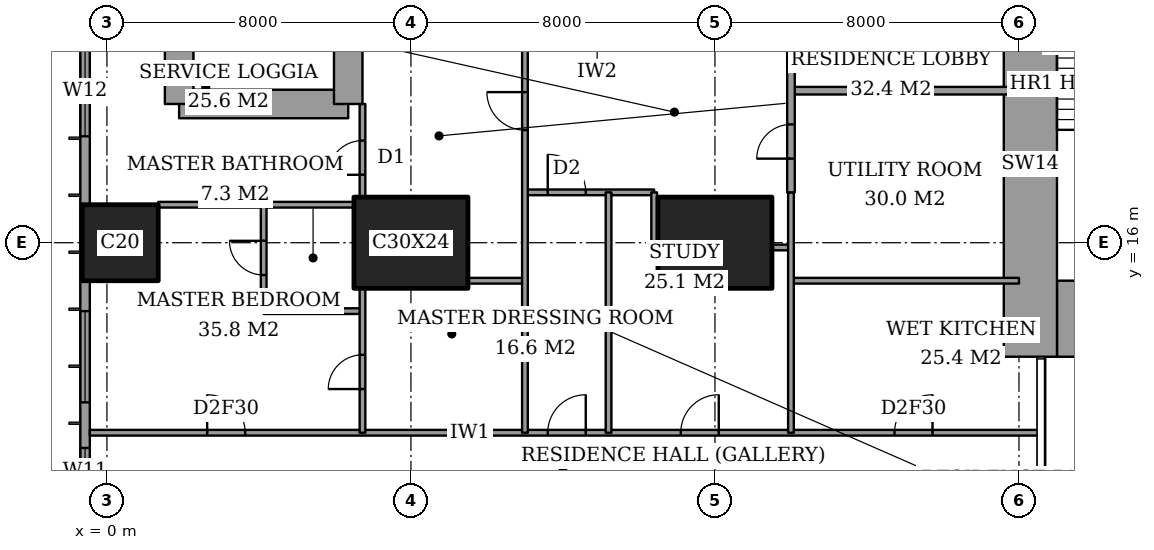
"""IFC4 building model, lengths in metres.
Left out: names, types, materials, properties, quantities, classifications, styles, units other than length and angle.
Written with IfcOpenShell. Run it as: python <this file> out.ifc"""

import sys

from ifc_helpers import new_model, si_unit, direction, frame, frame_2d, origin, origin_2d, place, context, subcontext, project, spatial, rectangle, extrude, element, fill, save


model = new_model("IFC4")
c1 = context("Model", 3, precision=1e-05, world=origin(), true_north=direction((0.0, 1.0)))
c2 = subcontext(c1, "Body", "Model", "MODEL_VIEW")
j1 = project(units=[si_unit("LENGTHUNIT", "METRE"), si_unit("PLANEANGLEUNIT", "RADIAN")], contexts=[c1])
p1 = place(None, origin())
s1 = spatial("IfcSite", under=j1, at=p1, CompositionType="ELEMENT")
p2 = place(p1, origin())
s2 = spatial("IfcBuilding", under=s1, at=p2, CompositionType="ELEMENT")
p3 = place(p2, frame((0.0, 0.0, 150.2)))
s3 = spatial("IfcBuildingStorey", under=s2, at=p3, CompositionType="ELEMENT", Elevation=150.2)
p4 = place(p3, frame((0.35, 16.0, 0.0), z_axis=(0.0, 0.0, 1.0), x_axis=(1.0, 0.0, 0.0)))
e1 = element("IfcColumn", 1, at=p4, inside=s3, PredefinedType="COLUMN", context=c2, shape_type="SweptSolid", body=[
    extrude(rectangle(XDim=2.0, YDim=2.0, at=origin_2d()), origin(), (0.0, 0.0, 1.0), 3.6),
])
for number, where, z_axis, x_axis in (
    (2, (8.0, 16.0, 0.0), (0.0, 0.0, 1.0), (1.0, 0.0, 0.0)),
    (3, (16.0, 16.0, 0.0), (0.0, 0.0, 1.0), (1.0, 0.0, 0.0)),
):
    element("IfcColumn", number, at=place(p3, frame(where, z_axis=z_axis, x_axis=x_axis)), inside=s3, PredefinedType="COLUMN", context=c2, shape_type="SweptSolid", body=[
        extrude(rectangle(XDim=3.0, YDim=2.4, at=origin_2d()), origin(), (0.0, 0.0, 1.0), 3.6),
    ])
p5 = place(p3, frame((25.0, 14.0, 0.0), z_axis=(0.0, 0.0, 1.0), x_axis=(1.0, 0.0, 0.0)))
e4 = element("IfcWall", 4, at=p5, inside=s3, PredefinedType="SHEAR", context=c2, shape_type="SweptSolid", body=[
    extrude(rectangle(XDim=3.15, YDim=2.0, at=frame_2d((1.575, 0.0))), origin(), (0.0, 0.0, 1.0), 3.6),
])
p6 = place(p3, frame((24.3, 13.0, 0.0), z_axis=(0.0, 0.0, 1.0), x_axis=(0.0, 1.0, 0.0)))
e5 = element("IfcWall", 5, at=p6, inside=s3, PredefinedType="SHEAR", context=c2, shape_type="SweptSolid", body=[
    extrude(rectangle(XDim=10.15, YDim=1.4, at=frame_2d((5.075, 0.0))), origin(), (0.0, 0.0, 1.0), 3.6),
])
p7 = place(p3, frame((1.9, 19.65, 0.0), z_axis=(0.0, 0.0, 1.0), x_axis=(1.0, 0.0, 0.0)))
e6 = element("IfcWall", 6, at=p7, inside=s3, PredefinedType="SHEAR", context=c2, shape_type="SweptSolid", body=[
    extrude(rectangle(XDim=4.45, YDim=0.75, at=frame_2d((2.225, 0.0))), origin(), (0.0, 0.0, 1.0), 3.6),
])
p8 = place(p3, frame((6.35, 19.65, 0.0), z_axis=(0.0, 0.0, 1.0), x_axis=(0.0, 1.0, 0.0)))
e7 = element("IfcWall", 7, at=p8, inside=s3, PredefinedType="SHEAR", context=c2, shape_type="SweptSolid", body=[
    extrude(rectangle(XDim=8.7, YDim=0.75, at=frame_2d((4.35, 0.0))), origin(), (0.0, 0.0, 1.0), 3.6),
])
p9 = place(p8, frame((6.725, 0.0, 0.0)))
e8 = element("IfcOpeningElement", 8, at=p9, cuts=e7, PredefinedType="OPENING", context=c2, shape_type="SweptSolid", body=[
    extrude(rectangle(XDim=1.0, YDim=2.1, at=frame_2d((0.5, 1.05))), frame((0.0, 0.385, 0.0), z_axis=(0.0, -1.0, 0.0), x_axis=(1.0, 0.0, 0.0)), (0.0, 0.0, 1.0), 0.77),
])
p10 = place(p3, frame((1.9, 28.35, 0.0), z_axis=(0.0, 0.0, 1.0), x_axis=(0.0, -1.0, 0.0)))
e9 = element("IfcWall", 9, at=p10, inside=s3, PredefinedType="SHEAR", context=c2, shape_type="SweptSolid", body=[
    extrude(rectangle(XDim=8.7, YDim=0.75, at=frame_2d((4.35, 0.0))), origin(), (0.0, 0.0, 1.0), 3.6),
])
p11 = place(p3, frame((-0.575, 44.825, 0.0), z_axis=(0.0, 0.0, 1.0), x_axis=(0.0, -1.0, 0.0)))
e10 = element("IfcWall", 10, at=p11, inside=s3, PredefinedType="SOLIDWALL", context=c2, shape_type="SweptSolid", body=[
    extrude(rectangle(XDim=41.65, YDim=0.25, at=frame_2d((20.825, 0.0))), origin(), (0.0, 0.0, 1.0), 3.6),
])
p12 = place(p11, frame((0.775, 0.0, 0.4)))
e11 = element("IfcOpeningElement", 11, at=p12, cuts=e10, PredefinedType="OPENING", context=c2, shape_type="SweptSolid", body=[
    extrude(rectangle(XDim=2.4, YDim=2.2, at=frame_2d((1.2, 1.1))), frame((0.0, 0.135, 0.0), z_axis=(0.0, -1.0, 0.0), x_axis=(1.0, 0.0, 0.0)), (0.0, 0.0, 1.0), 0.27),
])
p13 = place(p11, frame((6.1, 0.0, 0.4)))
e12 = element("IfcOpeningElement", 12, at=p13, cuts=e10, PredefinedType="OPENING", context=c2, shape_type="SweptSolid", body=[
    extrude(rectangle(XDim=1.2, YDim=2.2, at=frame_2d((0.6, 1.1))), frame((0.0, 0.135, 0.0), z_axis=(0.0, -1.0, 0.0), x_axis=(1.0, 0.0, 0.0)), (0.0, 0.0, 1.0), 0.27),
])
p14 = place(p11, frame((8.425, 0.0, 0.4)))
e13 = element("IfcOpeningElement", 13, at=p14, cuts=e10, PredefinedType="OPENING", context=c2, shape_type="SweptSolid", body=[
    extrude(rectangle(XDim=2.4, YDim=2.2, at=frame_2d((1.2, 1.1))), frame((0.0, 0.135, 0.0), z_axis=(0.0, -1.0, 0.0), x_axis=(1.0, 0.0, 0.0)), (0.0, 0.0, 1.0), 0.27),
])
p15 = place(p11, frame((15.625, 0.0, 0.4)))
e14 = element("IfcOpeningElement", 14, at=p15, cuts=e10, PredefinedType="OPENING", context=c2, shape_type="SweptSolid", body=[
    extrude(rectangle(XDim=2.4, YDim=2.2, at=frame_2d((1.2, 1.1))), frame((0.0, 0.135, 0.0), z_axis=(0.0, -1.0, 0.0), x_axis=(1.0, 0.0, 0.0)), (0.0, 0.0, 1.0), 0.27),
])
p16 = place(p11, frame((23.625, 0.0, 0.4)))
e15 = element("IfcOpeningElement", 15, at=p16, cuts=e10, PredefinedType="OPENING", context=c2, shape_type="SweptSolid", body=[
    extrude(rectangle(XDim=2.4, YDim=2.2, at=frame_2d((1.2, 1.1))), frame((0.0, 0.135, 0.0), z_axis=(0.0, -1.0, 0.0), x_axis=(1.0, 0.0, 0.0)), (0.0, 0.0, 1.0), 0.27),
])
p17 = place(p11, frame((30.625, 0.0, 0.4)))
e16 = element("IfcOpeningElement", 16, at=p17, cuts=e10, PredefinedType="OPENING", context=c2, shape_type="SweptSolid", body=[
    extrude(rectangle(XDim=2.4, YDim=2.2, at=frame_2d((1.2, 1.1))), frame((0.0, 0.135, 0.0), z_axis=(0.0, -1.0, 0.0), x_axis=(1.0, 0.0, 0.0)), (0.0, 0.0, 1.0), 0.27),
])
p18 = place(p11, frame((34.225, 0.0, 0.4)))
e17 = element("IfcOpeningElement", 17, at=p18, cuts=e10, PredefinedType="OPENING", context=c2, shape_type="SweptSolid", body=[
    extrude(rectangle(XDim=1.2, YDim=2.2, at=frame_2d((0.6, 1.1))), frame((0.0, 0.135, 0.0), z_axis=(0.0, -1.0, 0.0), x_axis=(1.0, 0.0, 0.0)), (0.0, 0.0, 1.0), 0.27),
])
p19 = place(p11, frame((38.475, 0.0, 0.4)))
e18 = element("IfcOpeningElement", 18, at=p19, cuts=e10, PredefinedType="OPENING", context=c2, shape_type="SweptSolid", body=[
    extrude(rectangle(XDim=2.4, YDim=2.2, at=frame_2d((1.2, 1.1))), frame((0.0, 0.135, 0.0), z_axis=(0.0, -1.0, 0.0), x_axis=(1.0, 0.0, 0.0)), (0.0, 0.0, 1.0), 0.27),
])
p20 = place(p3, frame((-0.45, 11.0, 0.0), z_axis=(0.0, 0.0, 1.0), x_axis=(1.0, 0.0, 0.0)))
e19 = element("IfcWall", 19, at=p20, inside=s3, PredefinedType="PARTITIONING", context=c2, shape_type="SweptSolid", body=[
    extrude(rectangle(XDim=25.011, YDim=0.15, at=frame_2d((12.505, 0.0))), origin(), (0.0, 0.0, 1.0), 3.35),
])
p21 = place(p20, frame((12.05, 0.0, 0.0)))
e20 = element("IfcOpeningElement", 20, at=p21, cuts=e19, PredefinedType="OPENING", context=c2, shape_type="SweptSolid", body=[
    extrude(rectangle(XDim=1.0, YDim=2.1, at=frame_2d((0.5, 1.05))), frame((0.0, 0.085, 0.0), z_axis=(0.0, -1.0, 0.0), x_axis=(1.0, 0.0, 0.0)), (0.0, 0.0, 1.0), 0.17),
])
p22 = place(p20, frame((3.087, 0.0, 0.0)))
e21 = element("IfcOpeningElement", 21, at=p22, cuts=e19, PredefinedType="OPENING", context=c2, shape_type="SweptSolid", body=[
    extrude(rectangle(XDim=1.0, YDim=2.1, at=frame_2d((0.5, 1.05))), frame((0.0, 0.085, 0.0), z_axis=(0.0, -1.0, 0.0), x_axis=(1.0, 0.0, 0.0)), (0.0, 0.0, 1.0), 0.17),
])
p23 = place(p20, frame((15.55, 0.0, 0.0)))
e22 = element("IfcOpeningElement", 22, at=p23, cuts=e19, PredefinedType="OPENING", context=c2, shape_type="SweptSolid", body=[
    extrude(rectangle(XDim=1.0, YDim=2.1, at=frame_2d((0.5, 1.05))), frame((0.0, 0.085, 0.0), z_axis=(0.0, -1.0, 0.0), x_axis=(1.0, 0.0, 0.0)), (0.0, 0.0, 1.0), 0.17),
])
p24 = place(p20, frame((21.175, 0.0, 0.0)))
e23 = element("IfcOpeningElement", 23, at=p24, cuts=e19, PredefinedType="OPENING", context=c2, shape_type="SweptSolid", body=[
    extrude(rectangle(XDim=1.0, YDim=2.1, at=frame_2d((0.5, 1.05))), frame((0.0, 0.085, 0.0), z_axis=(0.0, -1.0, 0.0), x_axis=(1.0, 0.0, 0.0)), (0.0, 0.0, 1.0), 0.17),
])
p25 = place(p3, frame((4.125, 14.2, 0.0), z_axis=(0.0, 0.0, 1.0), x_axis=(1.0, 0.0, 0.0)))
e24 = element("IfcWall", 24, at=p25, inside=s3, PredefinedType="PARTITIONING", context=c2, shape_type="SweptSolid", body=[
    extrude(rectangle(XDim=2.6, YDim=0.15, at=frame_2d((1.3, 0.0))), origin(), (0.0, 0.0, 1.0), 3.35),
])
p26 = place(p3, frame((9.5, 15.0, 0.0), z_axis=(0.0, 0.0, 1.0), x_axis=(1.0, 0.0, 0.0)))
e25 = element("IfcWall", 25, at=p26, inside=s3, PredefinedType="PARTITIONING", context=c2, shape_type="SweptSolid", body=[
    extrude(rectangle(XDim=1.5, YDim=0.15, at=frame_2d((0.75, 0.0))), origin(), (0.0, 0.0, 1.0), 3.35),
])
p27 = place(p3, frame((18.0, 15.0, 0.0), z_axis=(0.0, 0.0, 1.0), x_axis=(1.0, 0.0, 0.0)))
e26 = element("IfcWall", 26, at=p27, inside=s3, PredefinedType="PARTITIONING", context=c2, shape_type="SweptSolid", body=[
    extrude(rectangle(XDim=6.0, YDim=0.15, at=frame_2d((3.0, 0.0))), origin(), (0.0, 0.0, 1.0), 3.35),
])
p28 = place(p3, frame((17.5, 15.875, 0.0), z_axis=(0.0, 0.0, 1.0), x_axis=(1.0, 0.0, 0.0)))
e27 = element("IfcWall", 27, at=p28, inside=s3, PredefinedType="PARTITIONING", context=c2, shape_type="SweptSolid", body=[
    extrude(rectangle(XDim=0.5, YDim=0.15, at=frame_2d((0.25, 0.0))), origin(), (0.0, 0.0, 1.0), 2.634),
])
p29 = place(p3, frame((1.35, 17.0, 0.0), z_axis=(0.0, 0.0, 1.0), x_axis=(1.0, 0.0, 0.0)))
e28 = element("IfcWall", 28, at=p29, inside=s3, PredefinedType="PARTITIONING", context=c2, shape_type="SweptSolid", body=[
    extrude(rectangle(XDim=5.15, YDim=0.15, at=frame_2d((2.575, 0.0))), origin(), (0.0, 0.0, 1.0), 3.35),
])
p30 = place(p3, frame((11.0, 17.325, 0.0), z_axis=(0.0, 0.0, 1.0), x_axis=(1.0, 0.0, 0.0)))
e29 = element("IfcWall", 29, at=p30, inside=s3, PredefinedType="PARTITIONING", context=c2, shape_type="SweptSolid", body=[
    extrude(rectangle(XDim=3.4, YDim=0.15, at=frame_2d((1.7, 0.0))), origin(), (0.0, 0.0, 1.0), 3.35),
])
p31 = place(p30, frame((0.6, 0.0, 0.0)))
e30 = element("IfcOpeningElement", 30, at=p31, cuts=e29, PredefinedType="OPENING", context=c2, shape_type="SweptSolid", body=[
    extrude(rectangle(XDim=1.0, YDim=2.1, at=frame_2d((0.5, 1.05))), frame((0.0, 0.085, 0.0), z_axis=(0.0, -1.0, 0.0), x_axis=(1.0, 0.0, 0.0)), (0.0, 0.0, 1.0), 0.17),
])
p32 = place(p3, frame((18.0, 20.0, 0.0), z_axis=(0.0, 0.0, 1.0), x_axis=(1.0, 0.0, 0.0)))
e31 = element("IfcWall", 31, at=p32, inside=s3, PredefinedType="PARTITIONING", context=c2, shape_type="SweptSolid", body=[
    extrude(rectangle(XDim=6.0, YDim=0.2, at=frame_2d((3.0, 0.0))), origin(), (0.0, 0.0, 1.0), 3.35),
])
p33 = place(p3, frame((4.125, 14.2, 0.0), z_axis=(0.0, 0.0, 1.0), x_axis=(0.0, 1.0, 0.0)))
e32 = element("IfcWall", 32, at=p33, inside=s3, PredefinedType="PARTITIONING", context=c2, shape_type="SweptSolid", body=[
    extrude(rectangle(XDim=2.8, YDim=0.15, at=frame_2d((1.4, 0.0))), origin(), (0.0, 0.0, 1.0), 3.35),
])
p34 = place(p33, frame((0.95, 0.0, 0.0)))
e33 = element("IfcOpeningElement", 33, at=p34, cuts=e32, PredefinedType="OPENING", context=c2, shape_type="SweptSolid", body=[
    extrude(rectangle(XDim=0.9, YDim=2.1, at=frame_2d((0.45, 1.05))), frame((0.0, 0.085, 0.0), z_axis=(0.0, -1.0, 0.0), x_axis=(1.0, 0.0, 0.0)), (0.0, 0.0, 1.0), 0.17),
])
p35 = place(p3, frame((6.725, 11.0, 0.0), z_axis=(0.0, 0.0, 1.0), x_axis=(0.0, 1.0, 0.0)))
e34 = element("IfcWall", 34, at=p35, inside=s3, PredefinedType="PARTITIONING", context=c2, shape_type="SweptSolid", body=[
    extrude(rectangle(XDim=3.8, YDim=0.15, at=frame_2d((1.9, 0.0))), origin(), (0.0, 0.0, 1.0), 3.35),
])
p36 = place(p35, frame((1.15, 0.0, 0.0)))
e35 = element("IfcOpeningElement", 35, at=p36, cuts=e34, PredefinedType="OPENING", context=c2, shape_type="SweptSolid", body=[
    extrude(rectangle(XDim=0.9, YDim=2.1, at=frame_2d((0.45, 1.05))), frame((0.0, 0.085, 0.0), z_axis=(0.0, -1.0, 0.0), x_axis=(1.0, 0.0, 0.0)), (0.0, 0.0, 1.0), 0.17),
])
p37 = place(p3, frame((6.725, 17.2, 0.0), z_axis=(0.0, 0.0, 1.0), x_axis=(0.0, 1.0, 0.0)))
e36 = element("IfcWall", 36, at=p37, inside=s3, PredefinedType="PARTITIONING", context=c2, shape_type="SweptSolid", body=[
    extrude(rectangle(XDim=2.45, YDim=0.15, at=frame_2d((1.225, 0.0))), origin(), (0.0, 0.0, 1.0), 3.35),
])
p38 = place(p37, frame((0.587, 0.0, 0.0)))
e37 = element("IfcOpeningElement", 37, at=p38, cuts=e36, PredefinedType="OPENING", context=c2, shape_type="SweptSolid", body=[
    extrude(rectangle(XDim=0.9, YDim=2.1, at=frame_2d((0.45, 1.05))), frame((0.0, 0.085, 0.0), z_axis=(0.0, -1.0, 0.0), x_axis=(1.0, 0.0, 0.0)), (0.0, 0.0, 1.0), 0.17),
])
p39 = place(p3, frame((11.0, 11.0, 0.0), z_axis=(0.0, 0.0, 1.0), x_axis=(0.0, 1.0, 0.0)))
e38 = element("IfcWall", 38, at=p39, inside=s3, PredefinedType="PARTITIONING", context=c2, shape_type="SweptSolid", body=[
    extrude(rectangle(XDim=10.6, YDim=0.15, at=frame_2d((5.3, 0.0))), origin(), (0.0, 0.0, 1.0), 3.35),
])
p40 = place(p39, frame((7.962, 0.0, 0.0)))
e39 = element("IfcOpeningElement", 39, at=p40, cuts=e38, PredefinedType="OPENING", context=c2, shape_type="SweptSolid", body=[
    extrude(rectangle(XDim=1.0, YDim=2.1, at=frame_2d((0.5, 1.05))), frame((0.0, 0.085, 0.0), z_axis=(0.0, -1.0, 0.0), x_axis=(1.0, 0.0, 0.0)), (0.0, 0.0, 1.0), 0.17),
])
p41 = place(p3, frame((13.2, 11.0, 0.0), z_axis=(0.0, 0.0, 1.0), x_axis=(0.0, 1.0, 0.0)))
e40 = element("IfcWall", 40, at=p41, inside=s3, PredefinedType="PARTITIONING", context=c2, shape_type="SweptSolid", body=[
    extrude(rectangle(XDim=6.325, YDim=0.15, at=frame_2d((3.163, 0.0))), origin(), (0.0, 0.0, 1.0), 3.35),
])
p42 = place(p3, frame((14.4, 15.875, 0.0), z_axis=(0.0, 0.0, 1.0), x_axis=(0.0, 1.0, 0.0)))
e41 = element("IfcWall", 41, at=p42, inside=s3, PredefinedType="PARTITIONING", context=c2, shape_type="SweptSolid", body=[
    extrude(rectangle(XDim=1.45, YDim=0.15, at=frame_2d((0.725, 0.0))), origin(), (0.0, 0.0, 1.0), 3.35),
])
p43 = place(p3, frame((18.0, 17.325, 0.0), z_axis=(0.0, 0.0, 1.0), x_axis=(0.0, 1.0, 0.0)))
e42 = element("IfcWall", 42, at=p43, inside=s3, PredefinedType="PARTITIONING", context=c2, shape_type="SweptSolid", body=[
    extrude(rectangle(XDim=6.675, YDim=0.2, at=frame_2d((3.337, 0.0))), origin(), (0.0, 0.0, 1.0), 3.35),
])
p44 = place(p43, frame((4.075, 0.0, 0.0)))
e43 = element("IfcOpeningElement", 43, at=p44, cuts=e42, PredefinedType="OPENING", context=c2, shape_type="SweptSolid", body=[
    extrude(rectangle(XDim=1.2, YDim=2.4, at=frame_2d((0.6, 1.2))), frame((0.0, 0.11, 0.0), z_axis=(0.0, -1.0, 0.0), x_axis=(1.0, 0.0, 0.0)), (0.0, 0.0, 1.0), 0.22),
])
p45 = place(p43, frame((0.887, 0.0, 0.0)))
e44 = element("IfcOpeningElement", 44, at=p45, cuts=e42, PredefinedType="OPENING", context=c2, shape_type="SweptSolid", body=[
    extrude(rectangle(XDim=0.9, YDim=2.1, at=frame_2d((0.45, 1.05))), frame((0.0, 0.11, 0.0), z_axis=(0.0, -1.0, 0.0), x_axis=(1.0, 0.0, 0.0)), (0.0, 0.0, 1.0), 0.22),
])
p46 = place(p3, frame((18.0, 11.0, 0.0), z_axis=(0.0, 0.0, 1.0), x_axis=(0.0, 1.0, 0.0)))
e45 = element("IfcWall", 45, at=p46, inside=s3, PredefinedType="PARTITIONING", context=c2, shape_type="SweptSolid", body=[
    extrude(rectangle(XDim=6.325, YDim=0.15, at=frame_2d((3.163, 0.0))), origin(), (0.0, 0.0, 1.0), 3.35),
])
p47 = place(p16, origin())
e46 = element("IfcWindow", 46, at=p47, inside=s3, PartitioningType="SINGLE_PANEL", PredefinedType="WINDOW", context=c2, shape_type="SweptSolid", body=[
    extrude(rectangle(XDim=2.4, YDim=2.2, at=frame_2d((1.2, 1.1))), frame((0.0, 0.03, 0.0), z_axis=(0.0, -1.0, 0.0), x_axis=(1.0, 0.0, 0.0)), (0.0, 0.0, 1.0), 0.06),
])
fill(e15, e46)
p48 = place(p17, origin())
e47 = element("IfcWindow", 47, at=p48, inside=s3, PartitioningType="SINGLE_PANEL", PredefinedType="WINDOW", context=c2, shape_type="SweptSolid", body=[
    extrude(rectangle(XDim=2.4, YDim=2.2, at=frame_2d((1.2, 1.1))), frame((0.0, 0.03, 0.0), z_axis=(0.0, -1.0, 0.0), x_axis=(1.0, 0.0, 0.0)), (0.0, 0.0, 1.0), 0.06),
])
fill(e16, e47)
p49 = place(p18, origin())
e48 = element("IfcWindow", 48, at=p49, inside=s3, PartitioningType="SINGLE_PANEL", PredefinedType="WINDOW", context=c2, shape_type="SweptSolid", body=[
    extrude(rectangle(XDim=1.2, YDim=2.2, at=frame_2d((0.6, 1.1))), frame((0.0, 0.03, 0.0), z_axis=(0.0, -1.0, 0.0), x_axis=(1.0, 0.0, 0.0)), (0.0, 0.0, 1.0), 0.06),
])
fill(e17, e48)
p50 = place(p21, origin())
e49 = element("IfcDoor", 49, at=p50, inside=s3, OperationType="SINGLE_SWING_LEFT", PredefinedType="DOOR", context=c2, shape_type="SweptSolid", body=[
    extrude(rectangle(XDim=1.0, YDim=2.1, at=frame_2d((0.5, 1.05))), frame((0.0, 0.025, 0.0), z_axis=(0.0, -1.0, 0.0), x_axis=(1.0, 0.0, 0.0)), (0.0, 0.0, 1.0), 0.05),
])
fill(e20, e49)
p51 = place(p34, origin())
e50 = element("IfcDoor", 50, at=p51, inside=s3, OperationType="SINGLE_SWING_LEFT", PredefinedType="DOOR", context=c2, shape_type="SweptSolid", body=[
    extrude(rectangle(XDim=0.9, YDim=2.1, at=frame_2d((0.45, 1.05))), frame((0.0, 0.025, 0.0), z_axis=(0.0, -1.0, 0.0), x_axis=(1.0, 0.0, 0.0)), (0.0, 0.0, 1.0), 0.05),
])
fill(e33, e50)
p52 = place(p22, origin())
e51 = element("IfcDoor", 51, at=p52, inside=s3, OperationType="SINGLE_SWING_RIGHT", PredefinedType="DOOR", context=c2, shape_type="SweptSolid", body=[
    extrude(rectangle(XDim=1.0, YDim=2.1, at=frame_2d((0.5, 1.05))), frame((0.0, 0.025, 0.0), z_axis=(0.0, -1.0, 0.0), x_axis=(1.0, 0.0, 0.0)), (0.0, 0.0, 1.0), 0.05),
])
fill(e21, e51)
p53 = place(p38, origin())
e52 = element("IfcDoor", 52, at=p53, inside=s3, OperationType="SINGLE_SWING_RIGHT", PredefinedType="DOOR", context=c2, shape_type="SweptSolid", body=[
    extrude(rectangle(XDim=0.9, YDim=2.1, at=frame_2d((0.45, 1.05))), frame((0.0, 0.025, 0.0), z_axis=(0.0, -1.0, 0.0), x_axis=(1.0, 0.0, 0.0)), (0.0, 0.0, 1.0), 0.05),
])
fill(e37, e52)
p54 = place(p36, origin())
e53 = element("IfcDoor", 53, at=p54, inside=s3, OperationType="SINGLE_SWING_RIGHT", PredefinedType="DOOR", context=c2, shape_type="SweptSolid", body=[
    extrude(rectangle(XDim=0.9, YDim=2.1, at=frame_2d((0.45, 1.05))), frame((0.0, 0.025, 0.0), z_axis=(0.0, -1.0, 0.0), x_axis=(1.0, 0.0, 0.0)), (0.0, 0.0, 1.0), 0.05),
])
fill(e35, e53)
p55 = place(p40, origin())
e54 = element("IfcDoor", 54, at=p55, inside=s3, OperationType="SINGLE_SWING_LEFT", PredefinedType="DOOR", context=c2, shape_type="SweptSolid", body=[
    extrude(rectangle(XDim=1.0, YDim=2.1, at=frame_2d((0.5, 1.05))), frame((0.0, 0.025, 0.0), z_axis=(0.0, -1.0, 0.0), x_axis=(1.0, 0.0, 0.0)), (0.0, 0.0, 1.0), 0.05),
])
fill(e39, e54)
p56 = place(p31, origin())
e55 = element("IfcDoor", 55, at=p56, inside=s3, OperationType="SINGLE_SWING_RIGHT", PredefinedType="DOOR", context=c2, shape_type="SweptSolid", body=[
    extrude(rectangle(XDim=1.0, YDim=2.1, at=frame_2d((0.5, 1.05))), frame((0.0, 0.025, 0.0), z_axis=(0.0, -1.0, 0.0), x_axis=(1.0, 0.0, 0.0)), (0.0, 0.0, 1.0), 0.05),
])
fill(e30, e55)
p57 = place(p23, origin())
e56 = element("IfcDoor", 56, at=p57, inside=s3, OperationType="SINGLE_SWING_LEFT", PredefinedType="DOOR", context=c2, shape_type="SweptSolid", body=[
    extrude(rectangle(XDim=1.0, YDim=2.1, at=frame_2d((0.5, 1.05))), frame((0.0, 0.025, 0.0), z_axis=(0.0, -1.0, 0.0), x_axis=(1.0, 0.0, 0.0)), (0.0, 0.0, 1.0), 0.05),
])
fill(e22, e56)
p58 = place(p24, origin())
e57 = element("IfcDoor", 57, at=p58, inside=s3, OperationType="SINGLE_SWING_LEFT", PredefinedType="DOOR", context=c2, shape_type="SweptSolid", body=[
    extrude(rectangle(XDim=1.0, YDim=2.1, at=frame_2d((0.5, 1.05))), frame((0.0, 0.025, 0.0), z_axis=(0.0, -1.0, 0.0), x_axis=(1.0, 0.0, 0.0)), (0.0, 0.0, 1.0), 0.05),
])
fill(e23, e57)
p59 = place(p45, origin())
e58 = element("IfcDoor", 58, at=p59, inside=s3, OperationType="SINGLE_SWING_RIGHT", PredefinedType="DOOR", context=c2, shape_type="SweptSolid", body=[
    extrude(rectangle(XDim=0.9, YDim=2.1, at=frame_2d((0.45, 1.05))), frame((0.0, 0.025, 0.0), z_axis=(0.0, -1.0, 0.0), x_axis=(1.0, 0.0, 0.0)), (0.0, 0.0, 1.0), 0.05),
])
fill(e44, e58)
save(model, sys.argv[1])
